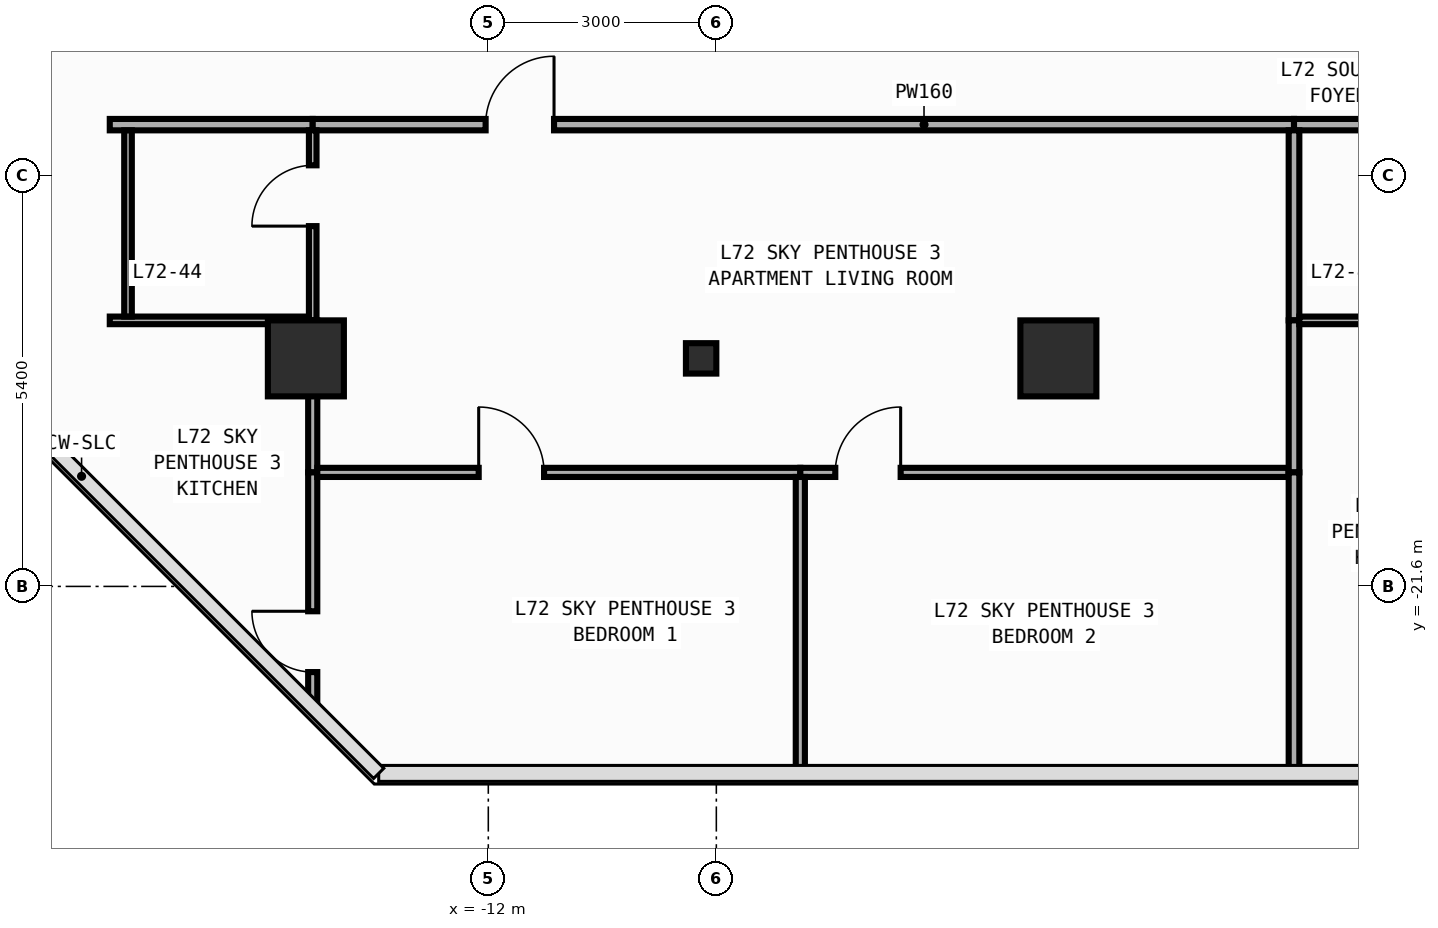
"""IFC4 building model, lengths in metres.
Left out: names, types, materials, properties, quantities, classifications, styles, units other than length and angle.
Written with IfcOpenShell. Run it as: python <this file> out.ifc"""

import sys

from ifc_helpers import new_model, si_unit, direction, frame, frame_2d, origin, origin_2d, place, context, subcontext, project, spatial, rectangle, circle, i_section, extrude, element, fill, save


model = new_model("IFC4")
c1 = context("Model", 3, precision=1e-05, world=origin(), true_north=direction((0.0, 1.0)))
c2 = subcontext(c1, "Body", "Model", "MODEL_VIEW")
j1 = project(units=[si_unit("LENGTHUNIT", "METRE"), si_unit("PLANEANGLEUNIT", "RADIAN")], contexts=[c1])
p1 = place(None, origin())
s1 = spatial("IfcSite", under=j1, at=p1, CompositionType="ELEMENT")
p2 = place(p1, origin())
s2 = spatial("IfcBuilding", under=s1, at=p2, CompositionType="ELEMENT")
p3 = place(p2, frame((0.0, 0.0, 300.4)))
s3 = spatial("IfcBuildingStorey", under=s2, at=p3, CompositionType="ELEMENT", Elevation=300.4)
p4 = place(p3, frame((-9.2, -18.6, 0.0), z_axis=(0.0, 0.0, 1.0), x_axis=(1.0, 0.0, 0.0)))
e1 = element("IfcColumn", 1, at=p4, inside=s3, PredefinedType="COLUMN", context=c2, shape_type="SweptSolid", body=[
    extrude(i_section(OverallWidth=0.4, OverallDepth=0.4, WebThickness=0.013, FlangeThickness=0.021, FilletRadius=0.022, at=origin_2d()), origin(), (0.0, 0.0, 1.0), 3.8),
])
for number, where, z_axis, x_axis in (
    (2, (-14.4, -18.6, 0.0), (0.0, 0.0, 1.0), (1.0, 0.0, 0.0)),
    (3, (-4.5, -18.6, 0.0), (0.0, 0.0, 1.0), (1.0, 0.0, 0.0)),
):
    element("IfcColumn", number, at=place(p3, frame(where, z_axis=z_axis, x_axis=x_axis)), inside=s3, PredefinedType="COLUMN", context=c2, shape_type="SweptSolid", body=[
        extrude(circle(Radius=0.5, at=origin_2d()), origin(), (0.0, 0.0, 1.0), 3.8),
    ])
p5 = place(p3, frame((-16.98, -15.525, 0.0), z_axis=(0.0, 0.0, 1.0), x_axis=(1.0, 0.0, 0.0)))
e4 = element("IfcWall", 4, at=p5, inside=s3, PredefinedType="PARTITIONING", context=c2, shape_type="SweptSolid", body=[
    extrude(rectangle(XDim=2.67, YDim=0.15, at=frame_2d((1.335, 0.0))), origin(), (0.0, 0.0, 1.0), 3.54),
])
p6 = place(p3, frame((-14.31, -15.525, 0.0), z_axis=(0.0, 0.0, 1.0), x_axis=(1.0, 0.0, 0.0)))
e5 = element("IfcWall", 5, at=p6, inside=s3, PredefinedType="PARTITIONING", context=c2, shape_type="SweptSolid", body=[
    extrude(rectangle(XDim=12.91, YDim=0.15, at=frame_2d((6.455, 0.0))), origin(), (0.0, 0.0, 1.0), 3.54),
])
p7 = place(p6, frame((2.275, 0.0, 0.0)))
e6 = element("IfcOpeningElement", 6, at=p7, cuts=e5, PredefinedType="OPENING", context=c2, shape_type="SweptSolid", body=[
    extrude(rectangle(XDim=0.9, YDim=2.15, at=frame_2d((0.45, 1.075))), frame((0.0, 0.085, 0.0), z_axis=(0.0, -1.0, 0.0), x_axis=(1.0, 0.0, 0.0)), (0.0, 0.0, 1.0), 0.17),
])
p8 = place(p3, frame((-1.4, -15.525, 0.0), z_axis=(0.0, 0.0, 1.0), x_axis=(1.0, 0.0, 0.0)))
e7 = element("IfcWall", 7, at=p8, inside=s3, PredefinedType="PARTITIONING", context=c2, shape_type="SweptSolid", body=[
    extrude(rectangle(XDim=2.59, YDim=0.15, at=frame_2d((1.295, 0.0))), origin(), (0.0, 0.0, 1.0), 3.54),
])
p9 = place(p3, frame((-16.98, -18.1, 0.0), z_axis=(0.0, 0.0, 1.0), x_axis=(1.0, 0.0, 0.0)))
e8 = element("IfcWall", 8, at=p9, inside=s3, PredefinedType="PARTITIONING", context=c2, shape_type="SweptSolid", body=[
    extrude(rectangle(XDim=2.62, YDim=0.1, at=frame_2d((1.31, 0.0))), origin(), (0.0, 0.0, 1.0), 3.54),
])
p10 = place(p3, frame((-14.31, -18.1, 0.0), z_axis=(0.0, 0.0, 1.0), x_axis=(0.0, 1.0, 0.0)))
e9 = element("IfcWall", 9, at=p10, inside=s3, PredefinedType="PARTITIONING", context=c2, shape_type="SweptSolid", body=[
    extrude(rectangle(XDim=2.5, YDim=0.1, at=frame_2d((1.25, 0.0))), origin(), (0.0, 0.0, 1.0), 2.64),
])
p11 = place(p10, frame((1.24, 0.0, 0.0)))
e10 = element("IfcOpeningElement", 10, at=p11, cuts=e9, PredefinedType="OPENING", context=c2, shape_type="SweptSolid", body=[
    extrude(rectangle(XDim=0.8, YDim=2.1, at=frame_2d((0.4, 1.05))), frame((0.0, 0.06, 0.0), z_axis=(0.0, -1.0, 0.0), x_axis=(1.0, 0.0, 0.0)), (0.0, 0.0, 1.0), 0.12),
])
p12 = place(p3, frame((-14.31, -20.1, 0.0), z_axis=(0.0, 0.0, 1.0), x_axis=(0.0, 1.0, 0.0)))
e11 = element("IfcWall", 11, at=p12, inside=s3, PredefinedType="PARTITIONING", context=c2, shape_type="SweptSolid", body=[
    extrude(rectangle(XDim=2.0, YDim=0.12, at=frame_2d((1.0, 0.0))), origin(), (0.0, 0.0, 1.0), 2.64),
])
p13 = place(p3, frame((-14.31, -23.187, 0.0), z_axis=(0.0, 0.0, 1.0), x_axis=(0.0, 1.0, 0.0)))
e12 = element("IfcWall", 12, at=p13, inside=s3, PredefinedType="PARTITIONING", context=c2, shape_type="SweptSolid", body=[
    extrude(rectangle(XDim=3.087, YDim=0.12, at=frame_2d((1.543, 0.0))), origin(), (0.0, 0.0, 1.0), 3.54),
])
p14 = place(p13, frame((0.46, 0.0, 0.0)))
e13 = element("IfcOpeningElement", 13, at=p14, cuts=e12, PredefinedType="OPENING", context=c2, shape_type="SweptSolid", body=[
    extrude(rectangle(XDim=0.8, YDim=2.1, at=frame_2d((0.4, 1.05))), frame((0.0, 0.07, 0.0), z_axis=(0.0, -1.0, 0.0), x_axis=(1.0, 0.0, 0.0)), (0.0, 0.0, 1.0), 0.14),
])
p15 = place(p3, frame((-14.25, -20.1, 0.0), z_axis=(0.0, 0.0, 1.0), x_axis=(1.0, 0.0, 0.0)))
e14 = element("IfcWall", 14, at=p15, inside=s3, PredefinedType="PARTITIONING", context=c2, shape_type="SweptSolid", body=[
    extrude(rectangle(XDim=6.355, YDim=0.12, at=frame_2d((3.177, 0.0))), origin(), (0.0, 0.0, 1.0), 3.54),
])
p16 = place(p15, frame((2.124, 0.0, 0.0)))
e15 = element("IfcOpeningElement", 15, at=p16, cuts=e14, PredefinedType="OPENING", context=c2, shape_type="SweptSolid", body=[
    extrude(rectangle(XDim=0.86, YDim=2.15, at=frame_2d((0.43, 1.075))), frame((0.0, 0.07, 0.0), z_axis=(0.0, -1.0, 0.0), x_axis=(1.0, 0.0, 0.0)), (0.0, 0.0, 1.0), 0.14),
])
p17 = place(p3, frame((-7.895, -20.1, 0.0), z_axis=(0.0, 0.0, 1.0), x_axis=(1.0, 0.0, 0.0)))
e16 = element("IfcWall", 16, at=p17, inside=s3, PredefinedType="PARTITIONING", context=c2, shape_type="SweptSolid", body=[
    extrude(rectangle(XDim=6.425, YDim=0.12, at=frame_2d((3.212, 0.0))), origin(), (0.0, 0.0, 1.0), 3.54),
])
p18 = place(p17, frame((0.46, 0.0, 0.0)))
e17 = element("IfcOpeningElement", 17, at=p18, cuts=e16, PredefinedType="OPENING", context=c2, shape_type="SweptSolid", body=[
    extrude(rectangle(XDim=0.86, YDim=2.15, at=frame_2d((0.43, 1.075))), frame((0.0, 0.07, 0.0), z_axis=(0.0, -1.0, 0.0), x_axis=(1.0, 0.0, 0.0)), (0.0, 0.0, 1.0), 0.14),
])
p19 = place(p3, frame((-1.4, -18.1, 0.0), z_axis=(0.0, 0.0, 1.0), x_axis=(0.0, 1.0, 0.0)))
e18 = element("IfcWall", 18, at=p19, inside=s3, PredefinedType="PARTITIONING", context=c2, shape_type="SweptSolid", body=[
    extrude(rectangle(XDim=2.5, YDim=0.14, at=frame_2d((1.25, 0.0))), origin(), (0.0, 0.0, 1.0), 3.54),
])
p20 = place(p3, frame((-1.4, -20.1, 0.0), z_axis=(0.0, 0.0, 1.0), x_axis=(0.0, 1.0, 0.0)))
e19 = element("IfcWall", 19, at=p20, inside=s3, PredefinedType="PARTITIONING", context=c2, shape_type="SweptSolid", body=[
    extrude(rectangle(XDim=2.0, YDim=0.14, at=frame_2d((1.0, 0.0))), origin(), (0.0, 0.0, 1.0), 3.54),
])
p21 = place(p3, frame((-7.895, -24.055, 0.0), z_axis=(0.0, 0.0, 1.0), x_axis=(0.0, 1.0, 0.0)))
e20 = element("IfcWall", 20, at=p21, inside=s3, PredefinedType="PARTITIONING", context=c2, shape_type="SweptSolid", body=[
    extrude(rectangle(XDim=3.895, YDim=0.12, at=frame_2d((1.948, 0.0))), origin(), (0.0, 0.0, 1.0), 3.54),
])
p22 = place(p3, frame((-1.4, -24.055, 0.0), z_axis=(0.0, 0.0, 1.0), x_axis=(0.0, 1.0, 0.0)))
e21 = element("IfcWall", 21, at=p22, inside=s3, PredefinedType="PARTITIONING", context=c2, shape_type="SweptSolid", body=[
    extrude(rectangle(XDim=3.955, YDim=0.14, at=frame_2d((1.978, 0.0))), origin(), (0.0, 0.0, 1.0), 3.54),
])
p23 = place(p3, frame((-1.33, -18.1, 0.0), z_axis=(0.0, 0.0, 1.0), x_axis=(1.0, 0.0, 0.0)))
e22 = element("IfcWall", 22, at=p23, inside=s3, PredefinedType="PARTITIONING", context=c2, shape_type="SweptSolid", body=[
    extrude(rectangle(XDim=2.47, YDim=0.1, at=frame_2d((1.235, 0.0))), origin(), (0.0, 0.0, 1.0), 3.54),
])
p24 = place(p3, frame((-16.74, -18.05, 0.0), z_axis=(0.0, 0.0, 1.0), x_axis=(0.0, 1.0, 0.0)))
e23 = element("IfcWall", 23, at=p24, inside=s3, PredefinedType="PARTITIONING", context=c2, shape_type="SweptSolid", body=[
    extrude(rectangle(XDim=2.45, YDim=0.1, at=frame_2d((1.225, 0.0))), origin(), (0.0, 0.0, 1.0), 3.54),
])
p25 = place(p7, origin())
e24 = element("IfcDoor", 24, at=p25, inside=s3, OperationType="SINGLE_SWING_RIGHT", PredefinedType="DOOR", context=c2, shape_type="SweptSolid", body=[
    extrude(rectangle(XDim=0.9, YDim=2.15, at=frame_2d((0.45, 1.075))), frame((0.0, 0.025, 0.0), z_axis=(0.0, -1.0, 0.0), x_axis=(1.0, 0.0, 0.0)), (0.0, 0.0, 1.0), 0.05),
])
fill(e6, e24)
p26 = place(p11, origin())
e25 = element("IfcDoor", 25, at=p26, inside=s3, OperationType="SINGLE_SWING_LEFT", PredefinedType="DOOR", context=c2, shape_type="SweptSolid", body=[
    extrude(rectangle(XDim=0.8, YDim=2.1, at=frame_2d((0.4, 1.05))), frame((0.0, 0.025, 0.0), z_axis=(0.0, -1.0, 0.0), x_axis=(1.0, 0.0, 0.0)), (0.0, 0.0, 1.0), 0.05),
])
fill(e10, e25)
p27 = place(p16, origin())
e26 = element("IfcDoor", 26, at=p27, inside=s3, OperationType="SINGLE_SWING_LEFT", PredefinedType="DOOR", context=c2, shape_type="SweptSolid", body=[
    extrude(rectangle(XDim=0.86, YDim=2.15, at=frame_2d((0.43, 1.075))), frame((0.0, 0.025, 0.0), z_axis=(0.0, -1.0, 0.0), x_axis=(1.0, 0.0, 0.0)), (0.0, 0.0, 1.0), 0.05),
])
fill(e15, e26)
p28 = place(p18, origin())
e27 = element("IfcDoor", 27, at=p28, inside=s3, OperationType="SINGLE_SWING_RIGHT", PredefinedType="DOOR", context=c2, shape_type="SweptSolid", body=[
    extrude(rectangle(XDim=0.86, YDim=2.15, at=frame_2d((0.43, 1.075))), frame((0.0, 0.025, 0.0), z_axis=(0.0, -1.0, 0.0), x_axis=(1.0, 0.0, 0.0)), (0.0, 0.0, 1.0), 0.05),
])
fill(e17, e27)
p29 = place(p14, origin())
e28 = element("IfcDoor", 28, at=p29, inside=s3, OperationType="SINGLE_SWING_RIGHT", PredefinedType="DOOR", context=c2, shape_type="SweptSolid", body=[
    extrude(rectangle(XDim=0.8, YDim=2.1, at=frame_2d((0.4, 1.05))), frame((0.0, 0.025, 0.0), z_axis=(0.0, -1.0, 0.0), x_axis=(1.0, 0.0, 0.0)), (0.0, 0.0, 1.0), 0.05),
])
fill(e13, e28)
save(model, sys.argv[1])
